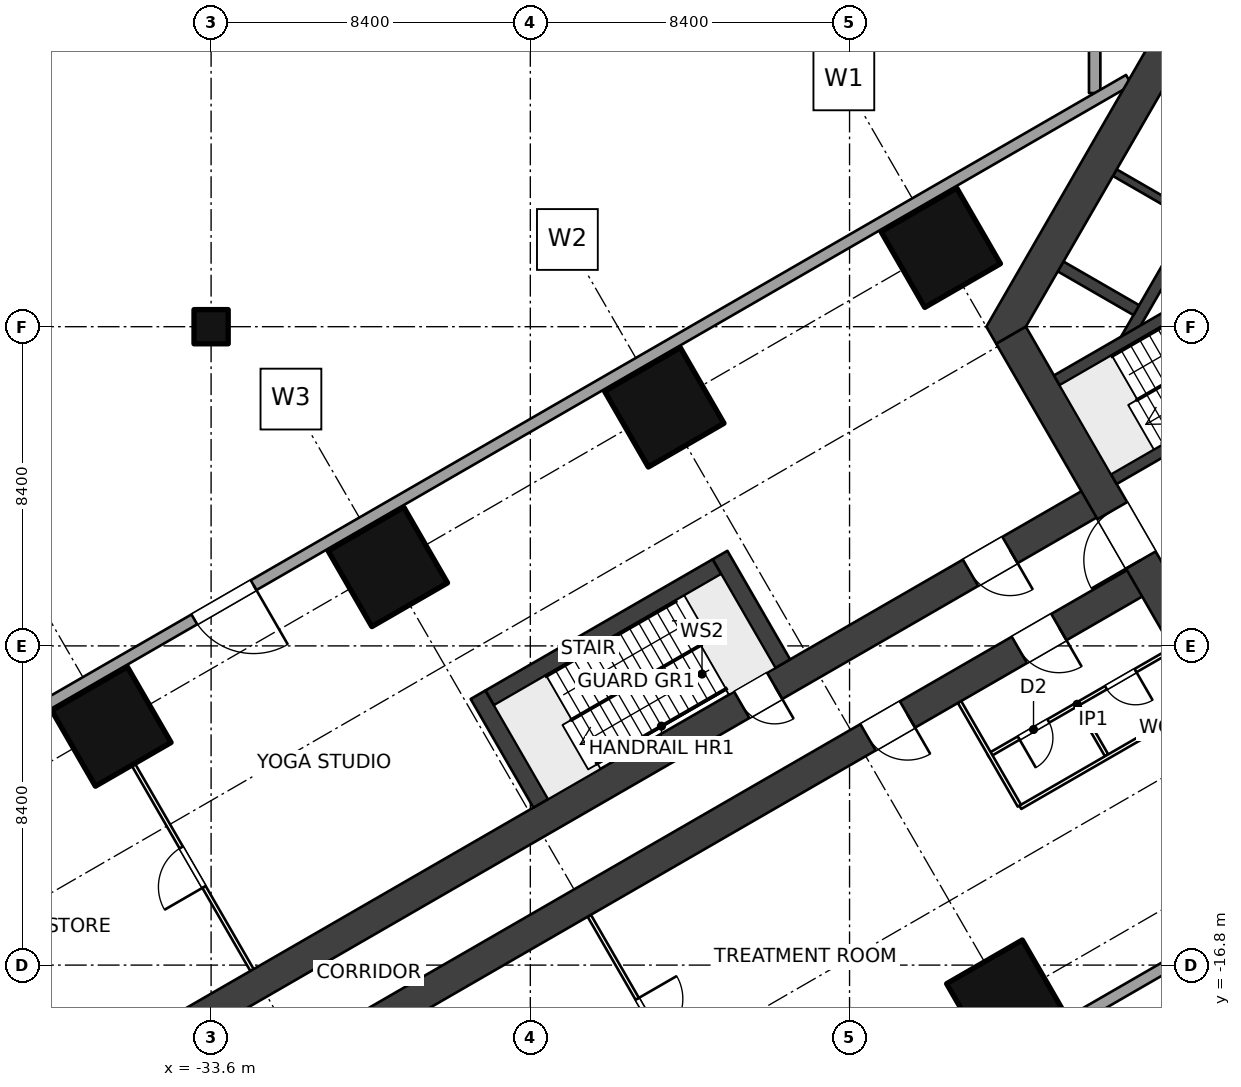
"""IFC4 building model, lengths in metres.
Left out: names, types, materials, properties, quantities, classifications, styles, units other than length and angle.
Written with IfcOpenShell. Run it as: python <this file> out.ifc"""

import sys

from ifc_helpers import new_model, si_unit, direction, frame, frame_2d, origin, origin_2d, place, context, subcontext, project, spatial, polyline, rectangle, outline, extrude, element, fill, save


model = new_model("IFC4")
c1 = context("Model", 3, precision=1e-05, world=origin(), true_north=direction((0.0, 1.0)))
c2 = subcontext(c1, "Body", "Model", "MODEL_VIEW")
j1 = project(units=[si_unit("LENGTHUNIT", "METRE"), si_unit("PLANEANGLEUNIT", "RADIAN")], contexts=[c1])
p1 = place(None, origin())
s1 = spatial("IfcSite", under=j1, at=p1, CompositionType="ELEMENT")
p2 = place(p1, origin())
s2 = spatial("IfcBuilding", under=s1, at=p2, CompositionType="ELEMENT")
p3 = place(p2, frame((0.0, 0.0, 11.0)))
s3 = spatial("IfcBuildingStorey", under=s2, at=p3, CompositionType="ELEMENT", Elevation=11.0)
for number, where, z_axis, x_axis in (
    (1, (-14.4, 2.078, 0.0), (0.0, 0.0, 1.0), (-0.5, 0.866, 0.0)),
    (2, (-12.675, -17.71, 0.0), (0.0, 0.0, 1.0), (-0.5, 0.866, 0.0)),
    (3, (-21.675, -2.122, 0.0), (0.0, 0.0, 1.0), (-0.5, 0.866, 0.0)),
    (4, (-28.949, -6.322, 0.0), (0.0, 0.0, 1.0), (-0.5, 0.866, 0.0)),
    (5, (-36.224, -10.521, 0.0), (0.0, 0.0, 1.0), (-0.5, 0.866, 0.0)),
):
    element("IfcColumn", number, at=place(p3, frame(where, z_axis=z_axis, x_axis=x_axis)), inside=s3, PredefinedType="COLUMN", context=c2, shape_type="SweptSolid", body=[
        extrude(rectangle(XDim=2.3, YDim=2.3, at=origin_2d()), origin(), (0.0, 0.0, 1.0), 5.0),
    ])
p4 = place(p3, frame((-33.6, 0.0, 0.0), z_axis=(0.0, 0.0, 1.0), x_axis=(1.0, 0.0, 0.0)))
e6 = element("IfcColumn", 6, at=p4, inside=s3, PredefinedType="COLUMN", context=c2, shape_type="SweptSolid", body=[
    extrude(rectangle(XDim=0.9, YDim=0.9, at=origin_2d()), origin(), (0.0, 0.0, 1.0), 5.0),
])
p5 = place(p3, frame((-6.47, -10.757, 0.0), z_axis=(0.0, 0.0, 1.0), x_axis=(-0.499997612506, 0.8660267822, 0.0)))
e7 = element("IfcWall", 7, at=p5, inside=s3, PredefinedType="SHEAR", context=c2, shape_type="SweptSolid", body=[
    extrude(rectangle(XDim=12.161, YDim=0.9, at=frame_2d((6.08, 0.0))), origin(), (0.0, 0.0, 1.0), 5.0),
])
p6 = place(p5, frame((5.33, 0.0, 0.0)))
e8 = element("IfcOpeningElement", 8, at=p6, cuts=e7, PredefinedType="OPENING", context=c2, shape_type="SweptSolid", body=[
    extrude(rectangle(XDim=1.5, YDim=2.1, at=frame_2d((0.75, 1.05))), frame((0.0, 0.46, 0.0), z_axis=(0.0, -1.0, 0.0), x_axis=(1.0, 0.0, 0.0)), (0.0, 0.0, 1.0), 0.92),
])
p7 = place(p3, origin())
e9 = element("IfcWall", 9, at=p7, inside=s3, PredefinedType="SHEAR", context=c2, shape_type="SweptSolid", body=[
    extrude(outline(polyline([(-6.6, 11.432), (-13.2, 0.0), (-12.94, -0.45), (-12.161, 0.0), (-6.08, 10.531), (-6.08, 11.432), (-6.6, 11.432)])), origin(), (0.0, 0.0, 1.0), 5.0),
])
p8 = place(p3, frame((-3.869, -0.559, 0.0), z_axis=(0.0, 0.0, 1.0), x_axis=(-0.86602711848, -0.499997030048, 0.0)))
e10 = element("IfcWall", 10, at=p8, inside=s3, PredefinedType="SHEAR", context=c2, shape_type="SweptSolid", body=[
    extrude(rectangle(XDim=6.901, YDim=0.3, at=frame_2d((3.451, 0.0))), origin(), (0.0, 0.0, 1.0), 5.0),
])
p9 = place(p8, frame((0.25, 0.0, 0.0)))
e11 = element("IfcOpeningElement", 11, at=p9, cuts=e10, PredefinedType="OPENING", context=c2, shape_type="SweptSolid", body=[
    extrude(rectangle(XDim=1.0, YDim=2.1, at=frame_2d((0.5, 1.05))), frame((0.0, 0.16, 0.0), z_axis=(0.0, -1.0, 0.0), x_axis=(1.0, 0.0, 0.0)), (0.0, 0.0, 1.0), 0.32),
])
p10 = place(p3, frame((-5.369, 2.039, 0.0), z_axis=(0.0, 0.0, 1.0), x_axis=(-0.86602711848, -0.499997030048, 0.0)))
e12 = element("IfcWall", 12, at=p10, inside=s3, PredefinedType="SHEAR", context=c2, shape_type="SweptSolid", body=[
    extrude(rectangle(XDim=6.901, YDim=0.3, at=frame_2d((3.451, 0.0))), origin(), (0.0, 0.0, 1.0), 5.0),
])
p11 = place(p3, frame((-9.548, -0.374, 0.0), z_axis=(0.0, 0.0, 1.0), x_axis=(0.500002290144, 0.866024081565, 0.0)))
e13 = element("IfcWall", 13, at=p11, inside=s3, PredefinedType="SHEAR", context=c2, shape_type="SweptSolid", body=[
    extrude(rectangle(XDim=10.195, YDim=0.3, at=frame_2d((5.098, 0.0))), origin(), (0.0, 0.0, 1.0), 5.0),
])
p12 = place(p3, frame((-9.254, 0.435, 0.0), z_axis=(0.0, 0.0, 1.0), x_axis=(-0.866007057882, 0.500031774688, 0.0)))
e14 = element("IfcWall", 14, at=p12, inside=s3, PredefinedType="SHEAR", context=c2, shape_type="SweptSolid", body=[
    extrude(rectangle(XDim=2.3, YDim=0.3, at=frame_2d((1.15, 0.0))), origin(), (0.0, 0.0, 1.0), 5.0),
])
p13 = place(p3, frame((-7.829, 2.903, 0.0), z_axis=(0.0, 0.0, 1.0), x_axis=(-0.866053019151, 0.499952165731, 0.0)))
e15 = element("IfcWall", 15, at=p13, inside=s3, PredefinedType="SHEAR", context=c2, shape_type="SweptSolid", body=[
    extrude(rectangle(XDim=2.3, YDim=0.2, at=frame_2d((1.15, 0.0))), origin(), (0.0, 0.0, 1.0), 5.0),
])
p14 = place(p3, frame((-8.91, -6.53, 0.0), z_axis=(0.0, 0.0, 1.0), x_axis=(-0.866024404313, -0.500001731131, 0.0)))
e16 = element("IfcWall", 16, at=p14, inside=s3, PredefinedType="SHEAR", context=c2, shape_type="SweptSolid", body=[
    extrude(rectangle(XDim=36.953, YDim=0.8, at=frame_2d((18.477, 0.0))), origin(), (0.0, 0.0, 1.0), 5.0),
])
p15 = place(p14, frame((2.75, 0.0, 0.0)))
e17 = element("IfcOpeningElement", 17, at=p15, cuts=e16, PredefinedType="OPENING", context=c2, shape_type="SweptSolid", body=[
    extrude(rectangle(XDim=1.2, YDim=2.1, at=frame_2d((0.6, 1.05))), frame((0.0, 0.41, 0.0), z_axis=(0.0, -1.0, 0.0), x_axis=(1.0, 0.0, 0.0)), (0.0, 0.0, 1.0), 0.82),
])
p16 = place(p14, frame((7.35, 0.0, 0.0)))
e18 = element("IfcOpeningElement", 18, at=p16, cuts=e16, PredefinedType="OPENING", context=c2, shape_type="SweptSolid", body=[
    extrude(rectangle(XDim=1.2, YDim=2.1, at=frame_2d((0.6, 1.05))), frame((0.0, 0.41, 0.0), z_axis=(0.0, -1.0, 0.0), x_axis=(1.0, 0.0, 0.0)), (0.0, 0.0, 1.0), 0.82),
])
p17 = place(p3, frame((-10.11, -4.451, 0.0), z_axis=(0.0, 0.0, 1.0), x_axis=(-0.866025284237, -0.500000207062, 0.0)))
e19 = element("IfcWall", 19, at=p17, inside=s3, PredefinedType="SHEAR", context=c2, shape_type="SweptSolid", body=[
    extrude(rectangle(XDim=36.75, YDim=0.8, at=frame_2d((18.375, 0.0))), origin(), (0.0, 0.0, 1.0), 5.0),
])
p18 = place(p17, frame((10.0, 0.0, 0.0)))
e20 = element("IfcOpeningElement", 20, at=p18, cuts=e19, PredefinedType="OPENING", context=c2, shape_type="SweptSolid", body=[
    extrude(rectangle(XDim=1.0, YDim=2.1, at=frame_2d((0.5, 1.05))), frame((0.0, 0.41, 0.0), z_axis=(0.0, -1.0, 0.0), x_axis=(1.0, 0.0, 0.0)), (0.0, 0.0, 1.0), 0.82),
])
p19 = place(p17, frame((2.85, 0.0, 0.0)))
e21 = element("IfcOpeningElement", 21, at=p19, cuts=e19, PredefinedType="OPENING", context=c2, shape_type="SweptSolid", body=[
    extrude(rectangle(XDim=1.2, YDim=2.1, at=frame_2d((0.6, 1.05))), frame((0.0, 0.41, 0.0), z_axis=(0.0, -1.0, 0.0), x_axis=(1.0, 0.0, 0.0)), (0.0, 0.0, 1.0), 0.82),
])
p20 = place(p3, frame((-8.3, -8.487, 0.0), z_axis=(0.0, 0.0, 1.0), x_axis=(-0.866015695474, -0.500016814911, 0.0)))
e22 = element("IfcWall", 22, at=p20, inside=s3, PredefinedType="PARTITIONING", context=c2, shape_type="SweptSolid", body=[
    extrude(rectangle(XDim=5.6, YDim=0.1, at=frame_2d((2.8, 0.0))), origin(), (0.0, 0.0, 1.0), 4.7),
])
p21 = place(p20, frame((1.125, 0.0, 0.0)))
e23 = element("IfcOpeningElement", 23, at=p21, cuts=e22, PredefinedType="OPENING", context=c2, shape_type="SweptSolid", body=[
    extrude(rectangle(XDim=0.9, YDim=2.1, at=frame_2d((0.45, 1.05))), frame((0.0, 0.06, 0.0), z_axis=(0.0, -1.0, 0.0), x_axis=(1.0, 0.0, 0.0)), (0.0, 0.0, 1.0), 0.12),
])
p22 = place(p20, frame((3.775, 0.0, 0.0)))
e24 = element("IfcOpeningElement", 24, at=p22, cuts=e22, PredefinedType="OPENING", context=c2, shape_type="SweptSolid", body=[
    extrude(rectangle(XDim=0.9, YDim=2.1, at=frame_2d((0.45, 1.05))), frame((0.0, 0.06, 0.0), z_axis=(0.0, -1.0, 0.0), x_axis=(1.0, 0.0, 0.0)), (0.0, 0.0, 1.0), 0.12),
])
p23 = place(p3, frame((-10.786, -9.98, 0.0), z_axis=(0.0, 0.0, 1.0), x_axis=(0.500060622324, -0.86599040064, 0.0)))
e25 = element("IfcWall", 25, at=p23, inside=s3, PredefinedType="PARTITIONING", context=c2, shape_type="SweptSolid", body=[
    extrude(rectangle(XDim=1.5, YDim=0.1, at=frame_2d((0.75, 0.0))), origin(), (0.0, 0.0, 1.0), 4.7),
])
p24 = place(p3, frame((-7.5, -9.873, 0.0), z_axis=(0.0, 0.0, 1.0), x_axis=(-0.866031018186, -0.499990275446, 0.0)))
e26 = element("IfcWall", 26, at=p24, inside=s3, PredefinedType="PARTITIONING", context=c2, shape_type="SweptSolid", body=[
    extrude(rectangle(XDim=5.55, YDim=0.1, at=frame_2d((2.775, 0.0))), origin(), (0.0, 0.0, 1.0), 4.7),
])
p25 = place(p3, frame((-13.906, -9.876, 0.0), z_axis=(0.0, 0.0, 1.0), x_axis=(0.499981869177, -0.866035871367, 0.0)))
e27 = element("IfcWall", 27, at=p25, inside=s3, PredefinedType="PARTITIONING", context=c2, shape_type="SweptSolid", body=[
    extrude(rectangle(XDim=3.15, YDim=0.1, at=frame_2d((1.575, 0.0))), origin(), (0.0, 0.0, 1.0), 4.7),
])
p26 = place(p3, frame((-23.649, -15.501, 0.0), z_axis=(0.0, 0.0, 1.0), x_axis=(0.500004234368, -0.866022959057, 0.0)))
e28 = element("IfcWall", 28, at=p26, inside=s3, PredefinedType="PARTITIONING", context=c2, shape_type="SweptSolid", body=[
    extrude(rectangle(XDim=6.25, YDim=0.1, at=frame_2d((3.125, 0.0))), origin(), (0.0, 0.0, 1.0), 2.9),
])
p27 = place(p26, frame((2.525, 0.0, 0.0)))
e29 = element("IfcOpeningElement", 29, at=p27, cuts=e28, PredefinedType="OPENING", context=c2, shape_type="SweptSolid", body=[
    extrude(rectangle(XDim=1.2, YDim=2.1, at=frame_2d((0.6, 1.05))), frame((0.0, 0.06, 0.0), z_axis=(0.0, -1.0, 0.0), x_axis=(1.0, 0.0, 0.0)), (0.0, 0.0, 1.0), 0.12),
])
p28 = place(p3, frame((-32.524, -16.93, 0.0), z_axis=(0.0, 0.0, 1.0), x_axis=(-0.500004234368, 0.866022959057, 0.0)))
e30 = element("IfcWall", 30, at=p28, inside=s3, PredefinedType="PARTITIONING", context=c2, shape_type="SweptSolid", body=[
    extrude(rectangle(XDim=6.25, YDim=0.1, at=frame_2d((3.125, 0.0))), origin(), (0.0, 0.0, 1.0), 2.9),
])
p29 = place(p28, frame((2.525, 0.0, 0.0)))
e31 = element("IfcOpeningElement", 31, at=p29, cuts=e30, PredefinedType="OPENING", context=c2, shape_type="SweptSolid", body=[
    extrude(rectangle(XDim=1.2, YDim=2.1, at=frame_2d((0.6, 1.05))), frame((0.0, 0.06, 0.0), z_axis=(0.0, -1.0, 0.0), x_axis=(1.0, 0.0, 0.0)), (0.0, 0.0, 1.0), 0.12),
])
p30 = place(p3, frame((-10.35, 6.149, 0.0), z_axis=(0.0, 0.0, 1.0), x_axis=(0.0, 1.0, 0.0)))
e32 = element("IfcWall", 32, at=p30, inside=s3, PredefinedType="SOLIDWALL", context=c2, shape_type="SweptSolid", body=[
    extrude(rectangle(XDim=41.883, YDim=0.3, at=frame_2d((20.941, 0.0))), origin(), (0.0, 0.0, 1.0), 4.7),
])
p31 = place(p30, frame((25.383, 0.0, 0.0)))
e33 = element("IfcOpeningElement", 33, at=p31, cuts=e32, PredefinedType="OPENING", context=c2, shape_type="SweptSolid", body=[
    extrude(rectangle(XDim=1.8, YDim=2.4, at=frame_2d((0.9, 1.2))), frame((0.0, 0.16, 0.0), z_axis=(0.0, -1.0, 0.0), x_axis=(1.0, 0.0, 0.0)), (0.0, 0.0, 1.0), 0.32),
])
p32 = place(p3, frame((-0.15, -12.038, 0.0), z_axis=(0.0, 0.0, 1.0), x_axis=(-0.866030473254, -0.499991219318, 0.0)))
e34 = element("IfcWall", 34, at=p32, inside=s3, PredefinedType="SOLIDWALL", context=c2, shape_type="SweptSolid", body=[
    extrude(rectangle(XDim=25.739, YDim=0.3, at=frame_2d((12.869, 0.0))), origin(), (0.0, 0.0, 1.0), 4.7),
])
p33 = place(p32, frame((16.983, 0.0, 0.0)))
e35 = element("IfcOpeningElement", 35, at=p33, cuts=e34, PredefinedType="OPENING", context=c2, shape_type="SweptSolid", body=[
    extrude(rectangle(XDim=1.8, YDim=2.4, at=frame_2d((0.9, 1.2))), frame((0.0, 0.16, 0.0), z_axis=(0.0, -1.0, 0.0), x_axis=(1.0, 0.0, 0.0)), (0.0, 0.0, 1.0), 0.32),
])
p34 = place(p3, frame((-9.45, 6.495, 0.0), z_axis=(0.0, 0.0, 1.0), x_axis=(-0.866025301493, -0.500000177174, 0.0)))
e36 = element("IfcWall", 36, at=p34, inside=s3, PredefinedType="SOLIDWALL", context=c2, shape_type="SweptSolid", body=[
    extrude(rectangle(XDim=43.095, YDim=0.3, at=frame_2d((21.548, 0.0))), origin(), (0.0, 0.0, 1.0), 4.7),
])
p35 = place(p34, frame((26.595, 0.0, 0.0)))
e37 = element("IfcOpeningElement", 37, at=p35, cuts=e36, PredefinedType="OPENING", context=c2, shape_type="SweptSolid", body=[
    extrude(rectangle(XDim=1.8, YDim=2.4, at=frame_2d((0.9, 1.2))), frame((0.0, 0.16, 0.0), z_axis=(0.0, -1.0, 0.0), x_axis=(1.0, 0.0, 0.0)), (0.0, 0.0, 1.0), 0.32),
])
for number, where, z_axis, x_axis in (
    (38, (-18.559, -8.868, 0.0), (0.0, 0.0, 1.0), (-0.5, 0.866, 0.0)),
    (39, (-24.925, -12.543, 0.0), (0.0, 0.0, 1.0), (-0.5, 0.866, 0.0)),
):
    element("IfcWall", number, at=place(p3, frame(where, z_axis=z_axis, x_axis=x_axis)), inside=s3, PredefinedType="SOLIDWALL", context=c2, shape_type="SweptSolid", body=[
        extrude(rectangle(XDim=3.3, YDim=0.45, at=frame_2d((1.65, 0.0))), origin(), (0.0, 0.0, 1.0), 5.0),
    ])
p36 = place(p3, frame((-20.292, -6.317, 0.0), z_axis=(0.0, 0.0, 1.0), x_axis=(-0.866028853923, -0.499994024137, 0.0)))
e40 = element("IfcWall", 40, at=p36, inside=s3, PredefinedType="SOLIDWALL", context=c2, shape_type="SweptSolid", body=[
    extrude(rectangle(XDim=6.9, YDim=0.45, at=frame_2d((3.45, 0.0))), origin(), (0.0, 0.0, 1.0), 5.0),
])
p37 = place(p6, origin())
e41 = element("IfcDoor", 41, at=p37, inside=s3, OperationType="DOUBLE_DOOR_DOUBLE_SWING", PredefinedType="DOOR", context=c2, shape_type="SweptSolid", body=[
    extrude(rectangle(XDim=1.5, YDim=2.1, at=frame_2d((0.75, 1.05))), frame((0.0, 0.025, 0.0), z_axis=(0.0, -1.0, 0.0), x_axis=(1.0, 0.0, 0.0)), (0.0, 0.0, 1.0), 0.05),
])
fill(e8, e41)
p38 = place(p18, origin())
e42 = element("IfcDoor", 42, at=p38, inside=s3, OperationType="SINGLE_SWING_LEFT", PredefinedType="DOOR", context=c2, shape_type="SweptSolid", body=[
    extrude(rectangle(XDim=1.0, YDim=2.1, at=frame_2d((0.5, 1.05))), frame((0.0, 0.025, 0.0), z_axis=(0.0, -1.0, 0.0), x_axis=(1.0, 0.0, 0.0)), (0.0, 0.0, 1.0), 0.05),
])
fill(e20, e42)
p39 = place(p21, origin())
e43 = element("IfcDoor", 43, at=p39, inside=s3, OperationType="SINGLE_SWING_LEFT", PredefinedType="DOOR", context=c2, shape_type="SweptSolid", body=[
    extrude(rectangle(XDim=0.9, YDim=2.1, at=frame_2d((0.45, 1.05))), frame((0.0, 0.025, 0.0), z_axis=(0.0, -1.0, 0.0), x_axis=(1.0, 0.0, 0.0)), (0.0, 0.0, 1.0), 0.05),
])
fill(e23, e43)
p40 = place(p22, origin())
e44 = element("IfcDoor", 44, at=p40, inside=s3, OperationType="SINGLE_SWING_RIGHT", PredefinedType="DOOR", context=c2, shape_type="SweptSolid", body=[
    extrude(rectangle(XDim=0.9, YDim=2.1, at=frame_2d((0.45, 1.05))), frame((0.0, 0.025, 0.0), z_axis=(0.0, -1.0, 0.0), x_axis=(1.0, 0.0, 0.0)), (0.0, 0.0, 1.0), 0.05),
])
fill(e24, e44)
p41 = place(p15, origin())
e45 = element("IfcDoor", 45, at=p41, inside=s3, OperationType="DOUBLE_SWING_LEFT", PredefinedType="DOOR", context=c2, shape_type="SweptSolid", body=[
    extrude(rectangle(XDim=1.2, YDim=2.1, at=frame_2d((0.6, 1.05))), frame((0.0, 0.025, 0.0), z_axis=(0.0, -1.0, 0.0), x_axis=(1.0, 0.0, 0.0)), (0.0, 0.0, 1.0), 0.05),
])
fill(e17, e45)
p42 = place(p27, origin())
e46 = element("IfcDoor", 46, at=p42, inside=s3, OperationType="DOUBLE_SWING_LEFT", PredefinedType="DOOR", context=c2, shape_type="SweptSolid", body=[
    extrude(rectangle(XDim=1.2, YDim=2.1, at=frame_2d((0.6, 1.05))), frame((0.0, 0.025, 0.0), z_axis=(0.0, -1.0, 0.0), x_axis=(1.0, 0.0, 0.0)), (0.0, 0.0, 1.0), 0.05),
])
fill(e29, e46)
p43 = place(p16, origin())
e47 = element("IfcDoor", 47, at=p43, inside=s3, OperationType="DOUBLE_SWING_LEFT", PredefinedType="DOOR", context=c2, shape_type="SweptSolid", body=[
    extrude(rectangle(XDim=1.2, YDim=2.1, at=frame_2d((0.6, 1.05))), frame((0.0, 0.025, 0.0), z_axis=(0.0, -1.0, 0.0), x_axis=(1.0, 0.0, 0.0)), (0.0, 0.0, 1.0), 0.05),
])
fill(e18, e47)
p44 = place(p29, origin())
e48 = element("IfcDoor", 48, at=p44, inside=s3, OperationType="DOUBLE_SWING_LEFT", PredefinedType="DOOR", context=c2, shape_type="SweptSolid", body=[
    extrude(rectangle(XDim=1.2, YDim=2.1, at=frame_2d((0.6, 1.05))), frame((0.0, 0.025, 0.0), z_axis=(0.0, -1.0, 0.0), x_axis=(1.0, 0.0, 0.0)), (0.0, 0.0, 1.0), 0.05),
])
fill(e31, e48)
p45 = place(p19, origin())
e49 = element("IfcDoor", 49, at=p45, inside=s3, OperationType="DOUBLE_SWING_LEFT", PredefinedType="DOOR", context=c2, shape_type="SweptSolid", body=[
    extrude(rectangle(XDim=1.2, YDim=2.1, at=frame_2d((0.6, 1.05))), frame((0.0, 0.025, 0.0), z_axis=(0.0, -1.0, 0.0), x_axis=(1.0, 0.0, 0.0)), (0.0, 0.0, 1.0), 0.05),
])
fill(e21, e49)
p46 = place(p35, origin())
e50 = element("IfcDoor", 50, at=p46, inside=s3, OperationType="DOUBLE_DOOR_DOUBLE_SWING", PredefinedType="DOOR", context=c2, shape_type="SweptSolid", body=[
    extrude(rectangle(XDim=1.8, YDim=2.4, at=frame_2d((0.9, 1.2))), frame((0.0, 0.025, 0.0), z_axis=(0.0, -1.0, 0.0), x_axis=(1.0, 0.0, 0.0)), (0.0, 0.0, 1.0), 0.05),
])
fill(e37, e50)
save(model, sys.argv[1])
